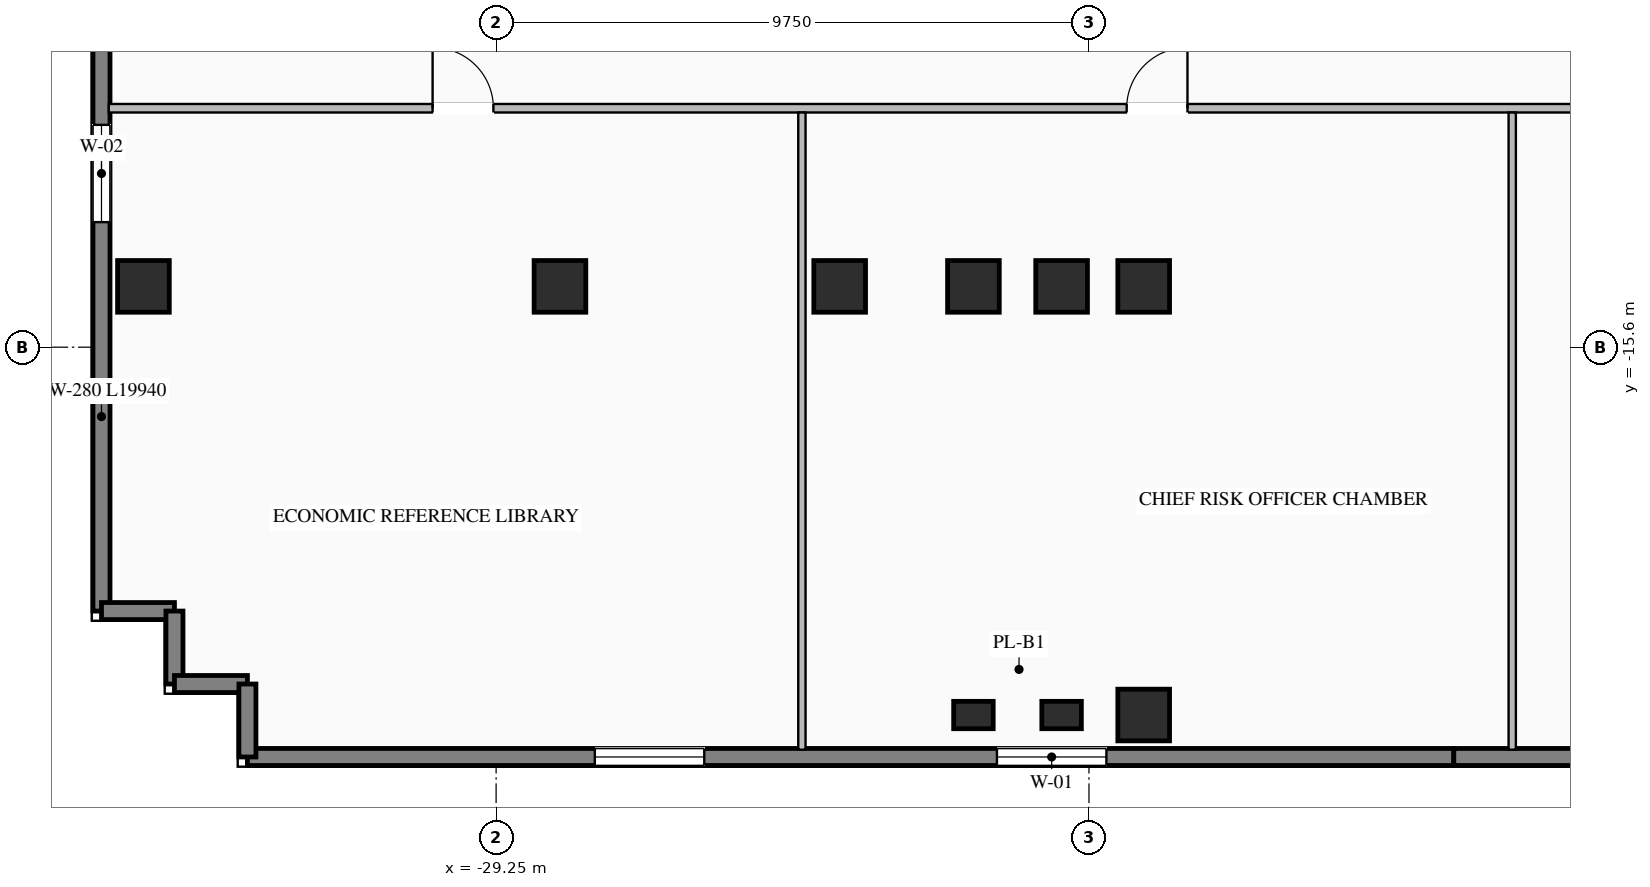
"""IFC4 building model, lengths in metres.
Left out: names, types, materials, properties, quantities, classifications, styles, units other than length and angle.
Written with IfcOpenShell. Run it as: python <this file> out.ifc"""

import sys

from ifc_helpers import new_model, si_unit, direction, frame, frame_2d, origin, origin_2d, place, context, subcontext, project, spatial, rectangle, i_section, extrude, element, fill, save


model = new_model("IFC4")
c1 = context("Model", 3, precision=1e-05, world=origin(), true_north=direction((0.0, 1.0)))
c2 = subcontext(c1, "Body", "Model", "MODEL_VIEW")
j1 = project(units=[si_unit("LENGTHUNIT", "METRE"), si_unit("PLANEANGLEUNIT", "RADIAN")], contexts=[c1])
p1 = place(None, origin())
s1 = spatial("IfcSite", under=j1, at=p1, CompositionType="ELEMENT")
p2 = place(p1, origin())
s2 = spatial("IfcBuilding", under=s1, at=p2, CompositionType="ELEMENT")
p3 = place(p2, frame((0.0, 0.0, 58.8)))
s3 = spatial("IfcBuildingStorey", under=s2, at=p3, CompositionType="ELEMENT", Elevation=58.8)
for number, where, z_axis, x_axis in (
    (1, (-21.4, -14.6, 0.0), (0.0, 0.0, 1.0), (1.0, 0.0, 0.0)),
    (2, (-19.95, -14.6, 0.0), (0.0, 0.0, 1.0), (1.0, 0.0, 0.0)),
    (3, (-18.6, -14.6, 0.0), (0.0, 0.0, 1.0), (1.0, 0.0, 0.0)),
    (4, (-23.6, -14.6, 0.0), (0.0, 0.0, 1.0), (1.0, 0.0, 0.0)),
    (5, (-28.2, -14.6, 0.0), (0.0, 0.0, 1.0), (1.0, 0.0, 0.0)),
    (6, (-18.6, -21.65, 0.0), (0.0, 0.0, 1.0), (1.0, 0.0, 0.0)),
    (7, (-35.05, -14.6, 0.0), (0.0, 0.0, 1.0), (1.0, 0.0, 0.0)),
):
    element("IfcColumn", number, at=place(p3, frame(where, z_axis=z_axis, x_axis=x_axis)), inside=s3, PredefinedType="COLUMN", context=c2, shape_type="SweptSolid", body=[
        extrude(i_section(OverallWidth=0.85, OverallDepth=0.85, WebThickness=0.032, FlangeThickness=0.048, at=origin_2d()), origin(), (0.0, 0.0, 1.0), 3.45),
    ])
for number, where, z_axis, x_axis in (
    (8, (-21.4, -21.65, 0.0), (0.0, 0.0, 1.0), (1.0, 0.0, 0.0)),
    (9, (-19.95, -21.65, 0.0), (0.0, 0.0, 1.0), (1.0, 0.0, 0.0)),
):
    element("IfcColumn", number, at=place(p3, frame(where, z_axis=z_axis, x_axis=x_axis)), inside=s3, PredefinedType="PILASTER", context=c2, shape_type="SweptSolid", body=[
        extrude(rectangle(XDim=0.65, YDim=0.45, at=origin_2d()), origin(), (0.0, 0.0, 1.0), 3.45),
    ])
p4 = place(p3, frame((-13.5, -22.34, 0.0), z_axis=(0.0, 0.0, 1.0), x_axis=(-1.0, 0.0, 0.0)))
e10 = element("IfcWall", 10, at=p4, inside=s3, PredefinedType="STANDARD", context=c2, shape_type="SweptSolid", body=[
    extrude(rectangle(XDim=19.84, YDim=0.28, at=frame_2d((9.92, 0.0))), origin(), (0.0, 0.0, 1.0), 3.25),
])
p5 = place(p4, frame((5.713, 0.0, 0.76)))
e11 = element("IfcOpeningElement", 11, at=p5, cuts=e10, PredefinedType="OPENING", context=c2, shape_type="SweptSolid", body=[
    extrude(rectangle(XDim=1.8, YDim=1.95, at=frame_2d((0.9, 0.975))), frame((0.0, 0.15, 0.0), z_axis=(0.0, -1.0, 0.0), x_axis=(1.0, 0.0, 0.0)), (0.0, 0.0, 1.0), 0.3),
])
p6 = place(p4, frame((12.327, 0.0, 0.76)))
e12 = element("IfcOpeningElement", 12, at=p6, cuts=e10, PredefinedType="OPENING", context=c2, shape_type="SweptSolid", body=[
    extrude(rectangle(XDim=1.8, YDim=1.95, at=frame_2d((0.9, 0.975))), frame((0.0, 0.15, 0.0), z_axis=(0.0, -1.0, 0.0), x_axis=(1.0, 0.0, 0.0)), (0.0, 0.0, 1.0), 0.3),
])
p7 = place(p3, frame((-4.5, -22.34, 0.0), z_axis=(0.0, 0.0, 1.0), x_axis=(-1.0, 0.0, 0.0)))
e13 = element("IfcWall", 13, at=p7, inside=s3, PredefinedType="STANDARD", context=c2, shape_type="SweptSolid", body=[
    extrude(rectangle(XDim=9.0, YDim=0.28, at=frame_2d((4.5, 0.0))), origin(), (0.0, 0.0, 1.0), 3.25),
])
p8 = place(p7, frame((2.1, 0.0, 0.76)))
e14 = element("IfcOpeningElement", 14, at=p8, cuts=e13, PredefinedType="OPENING", context=c2, shape_type="SweptSolid", body=[
    extrude(rectangle(XDim=1.8, YDim=1.95, at=frame_2d((0.9, 0.975))), frame((0.0, 0.15, 0.0), z_axis=(0.0, -1.0, 0.0), x_axis=(1.0, 0.0, 0.0)), (0.0, 0.0, 1.0), 0.3),
])
p9 = place(p7, frame((5.1, 0.0, 0.76)))
e15 = element("IfcOpeningElement", 15, at=p9, cuts=e13, PredefinedType="OPENING", context=c2, shape_type="SweptSolid", body=[
    extrude(rectangle(XDim=1.8, YDim=1.95, at=frame_2d((0.9, 0.975))), frame((0.0, 0.15, 0.0), z_axis=(0.0, -1.0, 0.0), x_axis=(1.0, 0.0, 0.0)), (0.0, 0.0, 1.0), 0.3),
])
p10 = place(p3, frame((-35.74, -19.94, 0.0), z_axis=(0.0, 0.0, 1.0), x_axis=(0.0, 1.0, 0.0)))
e16 = element("IfcWall", 16, at=p10, inside=s3, PredefinedType="STANDARD", context=c2, shape_type="SweptSolid", body=[
    extrude(rectangle(XDim=19.94, YDim=0.28, at=frame_2d((9.97, 0.0))), origin(), (0.0, 0.0, 1.0), 3.25),
])
p11 = place(p10, frame((6.397, 0.0, 0.76)))
e17 = element("IfcOpeningElement", 17, at=p11, cuts=e16, PredefinedType="OPENING", context=c2, shape_type="SweptSolid", body=[
    extrude(rectangle(XDim=1.6, YDim=1.95, at=frame_2d((0.8, 0.975))), frame((0.0, 0.15, 0.0), z_axis=(0.0, -1.0, 0.0), x_axis=(1.0, 0.0, 0.0)), (0.0, 0.0, 1.0), 0.3),
])
p12 = place(p10, frame((12.493, 0.0, 0.76)))
e18 = element("IfcOpeningElement", 18, at=p12, cuts=e16, PredefinedType="OPENING", context=c2, shape_type="SweptSolid", body=[
    extrude(rectangle(XDim=1.6, YDim=1.95, at=frame_2d((0.8, 0.975))), frame((0.0, 0.15, 0.0), z_axis=(0.0, -1.0, 0.0), x_axis=(1.0, 0.0, 0.0)), (0.0, 0.0, 1.0), 0.3),
])
for number, where, z_axis, x_axis in (
    (19, (-35.74, -19.94, 0.0), (0.0, 0.0, 1.0), (1.0, 0.0, 0.0)),
    (20, (-34.54, -19.94, 0.0), (0.0, 0.0, 1.0), (0.0, -1.0, 0.0)),
    (21, (-34.54, -21.14, 0.0), (0.0, 0.0, 1.0), (1.0, 0.0, 0.0)),
):
    element("IfcWall", number, at=place(p3, frame(where, z_axis=z_axis, x_axis=x_axis)), inside=s3, PredefinedType="STANDARD", context=c2, shape_type="SweptSolid", body=[
        extrude(rectangle(XDim=1.2, YDim=0.28, at=frame_2d((0.6, 0.0))), origin(), (0.0, 0.0, 1.0), 3.25),
    ])
p13 = place(p3, frame((-33.34, -21.14, 0.0), z_axis=(0.0, 0.0, 1.0), x_axis=(0.0, -1.0, 0.0)))
e22 = element("IfcWall", 22, at=p13, inside=s3, PredefinedType="STANDARD", context=c2, shape_type="SweptSolid", body=[
    extrude(rectangle(XDim=1.2, YDim=0.28, at=frame_2d((0.6, 0.0))), origin(), (0.0, 0.0, 1.0), 3.25),
])
p14 = place(p3, frame((-35.62, -11.67, 0.0), z_axis=(0.0, 0.0, 1.0), x_axis=(1.0, 0.0, 0.0)))
e23 = element("IfcWall", 23, at=p14, inside=s3, PredefinedType="STANDARD", context=c2, shape_type="SweptSolid", body=[
    extrude(rectangle(XDim=71.24, YDim=0.14, at=frame_2d((35.62, 0.0))), origin(), (0.0, 0.0, 1.0), 3.25),
])
p15 = place(p14, frame((35.71, 0.0, 0.0)))
e24 = element("IfcOpeningElement", 24, at=p15, cuts=e23, PredefinedType="OPENING", context=c2, shape_type="SweptSolid", body=[
    extrude(rectangle(XDim=0.92, YDim=2.08, at=frame_2d((0.46, 1.04))), frame((0.0, 0.08, 0.0), z_axis=(0.0, -1.0, 0.0), x_axis=(1.0, 0.0, 0.0)), (0.0, 0.0, 1.0), 0.16),
])
p16 = place(p14, frame((39.21, 0.0, 0.0)))
e25 = element("IfcOpeningElement", 25, at=p16, cuts=e23, PredefinedType="OPENING", context=c2, shape_type="SweptSolid", body=[
    extrude(rectangle(XDim=0.92, YDim=2.08, at=frame_2d((0.46, 1.04))), frame((0.0, 0.08, 0.0), z_axis=(0.0, -1.0, 0.0), x_axis=(1.0, 0.0, 0.0)), (0.0, 0.0, 1.0), 0.16),
])
p17 = place(p14, frame((42.06, 0.0, 0.0)))
e26 = element("IfcOpeningElement", 26, at=p17, cuts=e23, PredefinedType="OPENING", context=c2, shape_type="SweptSolid", body=[
    extrude(rectangle(XDim=0.92, YDim=2.08, at=frame_2d((0.46, 1.04))), frame((0.0, 0.08, 0.0), z_axis=(0.0, -1.0, 0.0), x_axis=(1.0, 0.0, 0.0)), (0.0, 0.0, 1.0), 0.16),
])
p18 = place(p14, frame((5.325, 0.0, 0.0)))
e27 = element("IfcOpeningElement", 27, at=p18, cuts=e23, PredefinedType="OPENING", context=c2, shape_type="SweptSolid", body=[
    extrude(rectangle(XDim=1.0, YDim=2.08, at=frame_2d((0.5, 1.04))), frame((0.0, 0.08, 0.0), z_axis=(0.0, -1.0, 0.0), x_axis=(1.0, 0.0, 0.0)), (0.0, 0.0, 1.0), 0.16),
])
p19 = place(p14, frame((16.74, 0.0, 0.0)))
e28 = element("IfcOpeningElement", 28, at=p19, cuts=e23, PredefinedType="OPENING", context=c2, shape_type="SweptSolid", body=[
    extrude(rectangle(XDim=1.0, YDim=2.08, at=frame_2d((0.5, 1.04))), frame((0.0, 0.08, 0.0), z_axis=(0.0, -1.0, 0.0), x_axis=(1.0, 0.0, 0.0)), (0.0, 0.0, 1.0), 0.16),
])
p20 = place(p14, frame((28.25, 0.0, 0.0)))
e29 = element("IfcOpeningElement", 29, at=p20, cuts=e23, PredefinedType="OPENING", context=c2, shape_type="SweptSolid", body=[
    extrude(rectangle(XDim=1.0, YDim=2.08, at=frame_2d((0.5, 1.04))), frame((0.0, 0.08, 0.0), z_axis=(0.0, -1.0, 0.0), x_axis=(1.0, 0.0, 0.0)), (0.0, 0.0, 1.0), 0.16),
])
p21 = place(p14, frame((47.667, 0.0, 0.0)))
e30 = element("IfcOpeningElement", 30, at=p21, cuts=e23, PredefinedType="OPENING", context=c2, shape_type="SweptSolid", body=[
    extrude(rectangle(XDim=1.0, YDim=2.08, at=frame_2d((0.5, 1.04))), frame((0.0, 0.08, 0.0), z_axis=(0.0, -1.0, 0.0), x_axis=(1.0, 0.0, 0.0)), (0.0, 0.0, 1.0), 0.16),
])
p22 = place(p14, frame((56.9, 0.0, 0.0)))
e31 = element("IfcOpeningElement", 31, at=p22, cuts=e23, PredefinedType="OPENING", context=c2, shape_type="SweptSolid", body=[
    extrude(rectangle(XDim=1.0, YDim=2.08, at=frame_2d((0.5, 1.04))), frame((0.0, 0.08, 0.0), z_axis=(0.0, -1.0, 0.0), x_axis=(1.0, 0.0, 0.0)), (0.0, 0.0, 1.0), 0.16),
])
p23 = place(p14, frame((66.037, 0.0, 0.0)))
e32 = element("IfcOpeningElement", 32, at=p23, cuts=e23, PredefinedType="OPENING", context=c2, shape_type="SweptSolid", body=[
    extrude(rectangle(XDim=1.0, YDim=2.08, at=frame_2d((0.5, 1.04))), frame((0.0, 0.08, 0.0), z_axis=(0.0, -1.0, 0.0), x_axis=(1.0, 0.0, 0.0)), (0.0, 0.0, 1.0), 0.16),
])
for number, where, z_axis, x_axis in (
    (33, (-24.221, -22.22, 0.0), (0.0, 0.0, 1.0), (0.0, 1.0, 0.0)),
    (34, (-12.539, -22.22, 0.0), (0.0, 0.0, 1.0), (0.0, 1.0, 0.0)),
):
    element("IfcWall", number, at=place(p3, frame(where, z_axis=z_axis, x_axis=x_axis)), inside=s3, PredefinedType="STANDARD", context=c2, shape_type="SweptSolid", body=[
        extrude(rectangle(XDim=10.48, YDim=0.12, at=frame_2d((5.24, 0.0))), origin(), (0.0, 0.0, 1.0), 3.25),
    ])
p24 = place(p5, origin())
e35 = element("IfcWindow", 35, at=p24, inside=s3, PartitioningType="SINGLE_PANEL", PredefinedType="WINDOW", context=c2, shape_type="SweptSolid", body=[
    extrude(rectangle(XDim=1.8, YDim=1.95, at=frame_2d((0.9, 0.975))), frame((0.0, 0.03, 0.0), z_axis=(0.0, -1.0, 0.0), x_axis=(1.0, 0.0, 0.0)), (0.0, 0.0, 1.0), 0.06),
])
fill(e11, e35)
p25 = place(p6, origin())
e36 = element("IfcWindow", 36, at=p25, inside=s3, PartitioningType="SINGLE_PANEL", PredefinedType="WINDOW", context=c2, shape_type="SweptSolid", body=[
    extrude(rectangle(XDim=1.8, YDim=1.95, at=frame_2d((0.9, 0.975))), frame((0.0, 0.03, 0.0), z_axis=(0.0, -1.0, 0.0), x_axis=(1.0, 0.0, 0.0)), (0.0, 0.0, 1.0), 0.06),
])
fill(e12, e36)
p26 = place(p11, origin())
e37 = element("IfcWindow", 37, at=p26, inside=s3, PartitioningType="SINGLE_PANEL", PredefinedType="WINDOW", context=c2, shape_type="SweptSolid", body=[
    extrude(rectangle(XDim=1.6, YDim=1.95, at=frame_2d((0.8, 0.975))), frame((0.0, 0.03, 0.0), z_axis=(0.0, -1.0, 0.0), x_axis=(1.0, 0.0, 0.0)), (0.0, 0.0, 1.0), 0.06),
])
fill(e17, e37)
p27 = place(p18, origin())
e38 = element("IfcDoor", 38, at=p27, inside=s3, OperationType="SINGLE_SWING_LEFT", PredefinedType="DOOR", context=c2, shape_type="SweptSolid", body=[
    extrude(rectangle(XDim=1.0, YDim=2.08, at=frame_2d((0.5, 1.04))), frame((0.0, 0.025, 0.0), z_axis=(0.0, -1.0, 0.0), x_axis=(1.0, 0.0, 0.0)), (0.0, 0.0, 1.0), 0.05),
])
fill(e27, e38)
p28 = place(p19, origin())
e39 = element("IfcDoor", 39, at=p28, inside=s3, OperationType="SINGLE_SWING_RIGHT", PredefinedType="DOOR", context=c2, shape_type="SweptSolid", body=[
    extrude(rectangle(XDim=1.0, YDim=2.08, at=frame_2d((0.5, 1.04))), frame((0.0, 0.025, 0.0), z_axis=(0.0, -1.0, 0.0), x_axis=(1.0, 0.0, 0.0)), (0.0, 0.0, 1.0), 0.05),
])
fill(e28, e39)
save(model, sys.argv[1])
